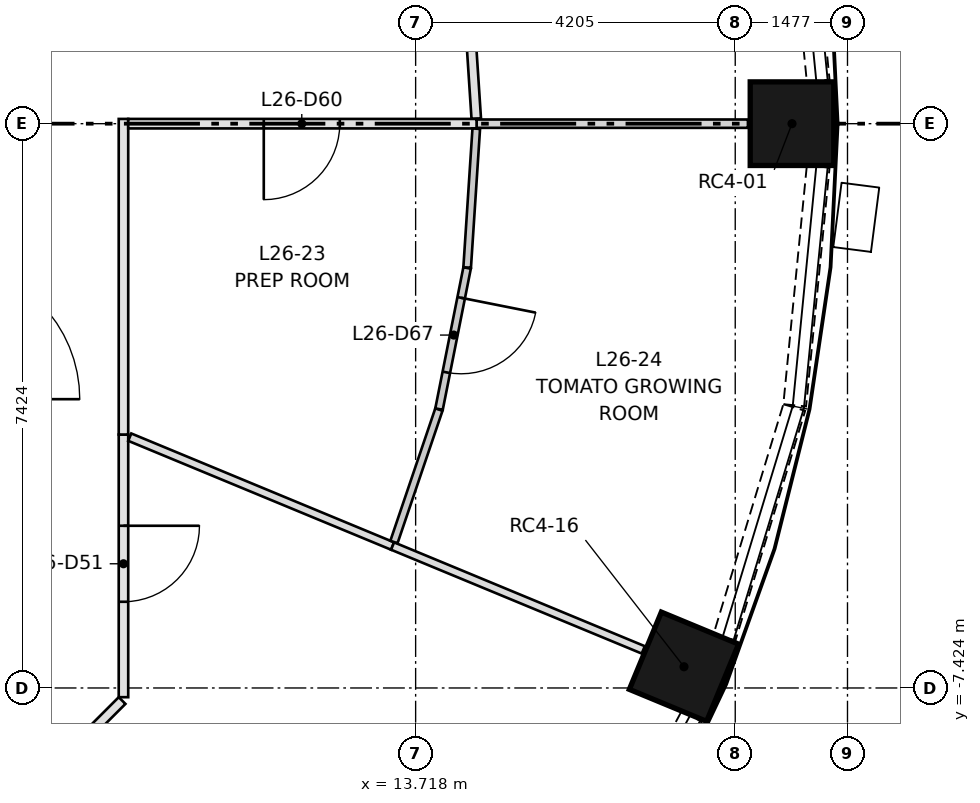
"""IFC4 building model, lengths in metres.
Left out: names, types, materials, properties, quantities, classifications, styles, units other than length and angle.
Written with IfcOpenShell. Run it as: python <this file> out.ifc"""

import sys

from ifc_helpers import new_model, si_unit, direction, frame, frame_2d, origin, origin_2d, place, context, subcontext, project, spatial, rectangle, extrude, element, fill, save


model = new_model("IFC4")
c1 = context("Model", 3, precision=1e-05, world=origin(), true_north=direction((0.0, 1.0)))
c2 = subcontext(c1, "Body", "Model", "MODEL_VIEW")
j1 = project(units=[si_unit("LENGTHUNIT", "METRE"), si_unit("PLANEANGLEUNIT", "RADIAN")], contexts=[c1])
p1 = place(None, origin())
s1 = spatial("IfcSite", under=j1, at=p1, CompositionType="ELEMENT")
p2 = place(p1, origin())
s2 = spatial("IfcBuilding", under=s1, at=p2, CompositionType="ELEMENT")
p3 = place(p2, frame((0.0, 0.0, 101.95)))
s3 = spatial("IfcBuildingStorey", under=s2, at=p3, CompositionType="ELEMENT", Elevation=101.95)
for number, where, z_axis, x_axis in (
    (1, (18.67, 0.0, 0.0), (0.0, 0.0, 1.0), (1.0, 0.0, 0.0)),
    (2, (17.249, -7.145, 0.0), (0.0, 0.0, 1.0), (0.924, -0.383, 0.0)),
):
    element("IfcColumn", number, at=place(p3, frame(where, z_axis=z_axis, x_axis=x_axis)), inside=s3, PredefinedType="COLUMN", context=c2, shape_type="SweptSolid", body=[
        extrude(rectangle(XDim=1.1, YDim=1.1, at=origin_2d()), origin(), (0.0, 0.0, 1.0), 3.65),
    ])
p4 = place(p3, frame((19.014, 0.564, 0.0), z_axis=(0.0, 0.0, 1.0), x_axis=(-0.097849336863, 0.995201239587, 0.0)))
e3 = element("IfcWall", 3, at=p4, inside=s3, PredefinedType="SOLIDWALL", context=c2, shape_type="SweptSolid", body=[
    extrude(rectangle(XDim=3.156, YDim=0.3, at=frame_2d((1.578, 0.0))), origin(), (0.0, 0.0, 1.0), 0.9),
])
p5 = place(p3, frame((15.863, -10.582, 0.0), z_axis=(0.0, 0.0, 1.0), x_axis=(0.471238306932, 0.882005928597, 0.0)))
e4 = element("IfcWall", 4, at=p5, inside=s3, PredefinedType="SOLIDWALL", context=c2, shape_type="SweptSolid", body=[
    extrude(rectangle(XDim=3.157, YDim=0.3, at=frame_2d((1.579, 0.0))), origin(), (0.0, 0.0, 1.0), 0.9),
])
p6 = place(p3, frame((17.782, -6.756, 0.0), z_axis=(0.0, 0.0, 1.0), x_axis=(0.290503096001, 0.956874051907, 0.0)))
e5 = element("IfcWall", 5, at=p6, inside=s3, PredefinedType="SOLIDWALL", context=c2, shape_type="SweptSolid", body=[
    extrude(rectangle(XDim=3.157, YDim=0.3, at=frame_2d((1.579, 0.0))), origin(), (0.0, 0.0, 1.0), 0.9),
])
p7 = place(p3, frame((18.706, -3.705, 0.0), z_axis=(0.0, 0.0, 1.0), x_axis=(0.097849336863, 0.995201239587, 0.0)))
e6 = element("IfcWall", 6, at=p7, inside=s3, PredefinedType="SOLIDWALL", context=c2, shape_type="SweptSolid", body=[
    extrude(rectangle(XDim=3.156, YDim=0.3, at=frame_2d((1.578, 0.0))), origin(), (0.0, 0.0, 1.0), 0.9),
])
p8 = place(p3, frame((9.856, -7.589, 0.0), z_axis=(0.0, 0.0, 1.0), x_axis=(-0.70718294931, -0.707030604857, 0.0)))
e7 = element("IfcWall", 7, at=p8, inside=s3, PredefinedType="PARTITIONING", context=c2, shape_type="SweptSolid", body=[
    extrude(rectangle(XDim=1.603, YDim=0.125, at=frame_2d((0.801, 0.0))), origin(), (0.0, 0.0, 1.0), 3.3),
])
p9 = place(p3, frame((9.874, -4.09, 0.0), z_axis=(0.0, 0.0, 1.0), x_axis=(0.0, -1.0, 0.0)))
e8 = element("IfcWall", 8, at=p9, inside=s3, PredefinedType="PARTITIONING", context=c2, shape_type="SweptSolid", body=[
    extrude(rectangle(XDim=3.455, YDim=0.125, at=frame_2d((1.728, 0.0))), origin(), (0.0, 0.0, 1.0), 3.3),
])
p10 = place(p9, frame((1.2, 0.0, 0.0)))
e9 = element("IfcOpeningElement", 9, at=p10, cuts=e8, PredefinedType="OPENING", context=c2, shape_type="SweptSolid", body=[
    extrude(rectangle(XDim=1.0, YDim=2.1, at=frame_2d((0.5, 1.05))), frame((0.0, 0.073, 0.0), z_axis=(0.0, -1.0, 0.0), x_axis=(1.0, 0.0, 0.0)), (0.0, 0.0, 1.0), 0.145),
])
p11 = place(p3, frame((9.874, 0.062, 0.0), z_axis=(0.0, 0.0, 1.0), x_axis=(0.0, -1.0, 0.0)))
e10 = element("IfcWall", 10, at=p11, inside=s3, PredefinedType="PARTITIONING", context=c2, shape_type="SweptSolid", body=[
    extrude(rectangle(XDim=4.152, YDim=0.125, at=frame_2d((2.076, 0.0))), origin(), (0.0, 0.0, 1.0), 3.3),
])
p12 = place(p3, frame((14.516, 0.067, 0.0), z_axis=(0.0, 0.0, 1.0), x_axis=(-0.065428883326, 0.997857234892, 0.0)))
e11 = element("IfcWall", 11, at=p12, inside=s3, PredefinedType="PARTITIONING", context=c2, shape_type="SweptSolid", body=[
    extrude(rectangle(XDim=1.828, YDim=0.125, at=frame_2d((0.914, 0.0))), origin(), (0.0, 0.0, 1.0), 3.3),
])
p13 = place(p3, frame((18.09, 0.0, 0.0), z_axis=(0.0, 0.0, 1.0), x_axis=(-1.0, 0.0, 0.0)))
e12 = element("IfcWall", 12, at=p13, inside=s3, PredefinedType="PARTITIONING", context=c2, shape_type="SweptSolid", body=[
    extrude(rectangle(XDim=3.57, YDim=0.11, at=frame_2d((1.785, 0.0))), origin(), (0.0, 0.0, 1.0), 3.3),
])
p14 = place(p3, frame((14.52, 0.0, 0.0), z_axis=(0.0, 0.0, 1.0), x_axis=(-1.0, 0.0, 0.0)))
e13 = element("IfcWall", 13, at=p14, inside=s3, PredefinedType="PARTITIONING", context=c2, shape_type="SweptSolid", body=[
    extrude(rectangle(XDim=4.583, YDim=0.125, at=frame_2d((2.292, 0.0))), origin(), (0.0, 0.0, 1.0), 3.3),
])
p15 = place(p14, frame((1.8, 0.0, 0.0)))
e14 = element("IfcOpeningElement", 14, at=p15, cuts=e13, PredefinedType="OPENING", context=c2, shape_type="SweptSolid", body=[
    extrude(rectangle(XDim=1.0, YDim=2.1, at=frame_2d((0.5, 1.05))), frame((0.0, 0.073, 0.0), z_axis=(0.0, -1.0, 0.0), x_axis=(1.0, 0.0, 0.0)), (0.0, 0.0, 1.0), 0.145),
])
p16 = place(p3, frame((9.957, -4.124, 0.0), z_axis=(0.0, 0.0, 1.0), x_axis=(0.923887259949, -0.382664776147, 0.0)))
e15 = element("IfcWall", 15, at=p16, inside=s3, PredefinedType="PARTITIONING", context=c2, shape_type="SweptSolid", body=[
    extrude(rectangle(XDim=3.743, YDim=0.105, at=frame_2d((1.872, 0.0))), origin(), (0.0, 0.0, 1.0), 3.3),
])
p17 = place(p3, frame((13.415, -5.556, 0.0), z_axis=(0.0, 0.0, 1.0), x_axis=(0.923870126847, -0.382706138858, 0.0)))
e16 = element("IfcWall", 16, at=p17, inside=s3, PredefinedType="PARTITIONING", context=c2, shape_type="SweptSolid", body=[
    extrude(rectangle(XDim=3.57, YDim=0.105, at=frame_2d((1.785, 0.0))), origin(), (0.0, 0.0, 1.0), 3.3),
])
p18 = place(p3, frame((14.024, -3.761, 0.0), z_axis=(0.0, 0.0, 1.0), x_axis=(-0.32147693474, -0.946917409508, 0.0)))
e17 = element("IfcWall", 17, at=p18, inside=s3, PredefinedType="PARTITIONING", context=c2, shape_type="SweptSolid", body=[
    extrude(rectangle(XDim=1.84, YDim=0.1, at=frame_2d((0.92, 0.0))), origin(), (0.0, 0.0, 1.0), 3.3),
])
p19 = place(p3, frame((14.395, -1.898, 0.0), z_axis=(0.0, 0.0, 1.0), x_axis=(-0.195148680089, -0.980773670456, 0.0)))
e18 = element("IfcWall", 18, at=p19, inside=s3, PredefinedType="PARTITIONING", context=c2, shape_type="SweptSolid", body=[
    extrude(rectangle(XDim=1.893, YDim=0.1, at=frame_2d((0.946, 0.0))), origin(), (0.0, 0.0, 1.0), 3.3),
])
p20 = place(p19, frame((0.4, 0.0, 0.0)))
e19 = element("IfcOpeningElement", 19, at=p20, cuts=e18, PredefinedType="OPENING", context=c2, shape_type="SweptSolid", body=[
    extrude(rectangle(XDim=1.0, YDim=2.1, at=frame_2d((0.5, 1.05))), frame((0.0, 0.06, 0.0), z_axis=(0.0, -1.0, 0.0), x_axis=(1.0, 0.0, 0.0)), (0.0, 0.0, 1.0), 0.12),
])
p21 = place(p3, frame((14.516, -0.066, 0.0), z_axis=(0.0, 0.0, 1.0), x_axis=(-0.065376617685, -0.997860660543, 0.0)))
e20 = element("IfcWall", 20, at=p21, inside=s3, PredefinedType="PARTITIONING", context=c2, shape_type="SweptSolid", body=[
    extrude(rectangle(XDim=1.83, YDim=0.1, at=frame_2d((0.915, 0.0))), origin(), (0.0, 0.0, 1.0), 3.3),
])
p22 = place(p10, origin())
e21 = element("IfcDoor", 21, at=p22, inside=s3, OperationType="SINGLE_SWING_LEFT", PredefinedType="DOOR", context=c2, shape_type="SweptSolid", body=[
    extrude(rectangle(XDim=1.0, YDim=2.1, at=frame_2d((0.5, 1.05))), frame((0.0, 0.025, 0.0), z_axis=(0.0, -1.0, 0.0), x_axis=(1.0, 0.0, 0.0)), (0.0, 0.0, 1.0), 0.05),
])
fill(e9, e21)
p23 = place(p15, origin())
e22 = element("IfcDoor", 22, at=p23, inside=s3, OperationType="SINGLE_SWING_RIGHT", PredefinedType="DOOR", context=c2, shape_type="SweptSolid", body=[
    extrude(rectangle(XDim=1.0, YDim=2.1, at=frame_2d((0.5, 1.05))), frame((0.0, 0.025, 0.0), z_axis=(0.0, -1.0, 0.0), x_axis=(1.0, 0.0, 0.0)), (0.0, 0.0, 1.0), 0.05),
])
fill(e14, e22)
p24 = place(p20, origin())
e23 = element("IfcDoor", 23, at=p24, inside=s3, OperationType="SINGLE_SWING_LEFT", PredefinedType="DOOR", context=c2, shape_type="SweptSolid", body=[
    extrude(rectangle(XDim=1.0, YDim=2.1, at=frame_2d((0.5, 1.05))), frame((0.0, 0.025, 0.0), z_axis=(0.0, -1.0, 0.0), x_axis=(1.0, 0.0, 0.0)), (0.0, 0.0, 1.0), 0.05),
])
fill(e19, e23)
save(model, sys.argv[1])
